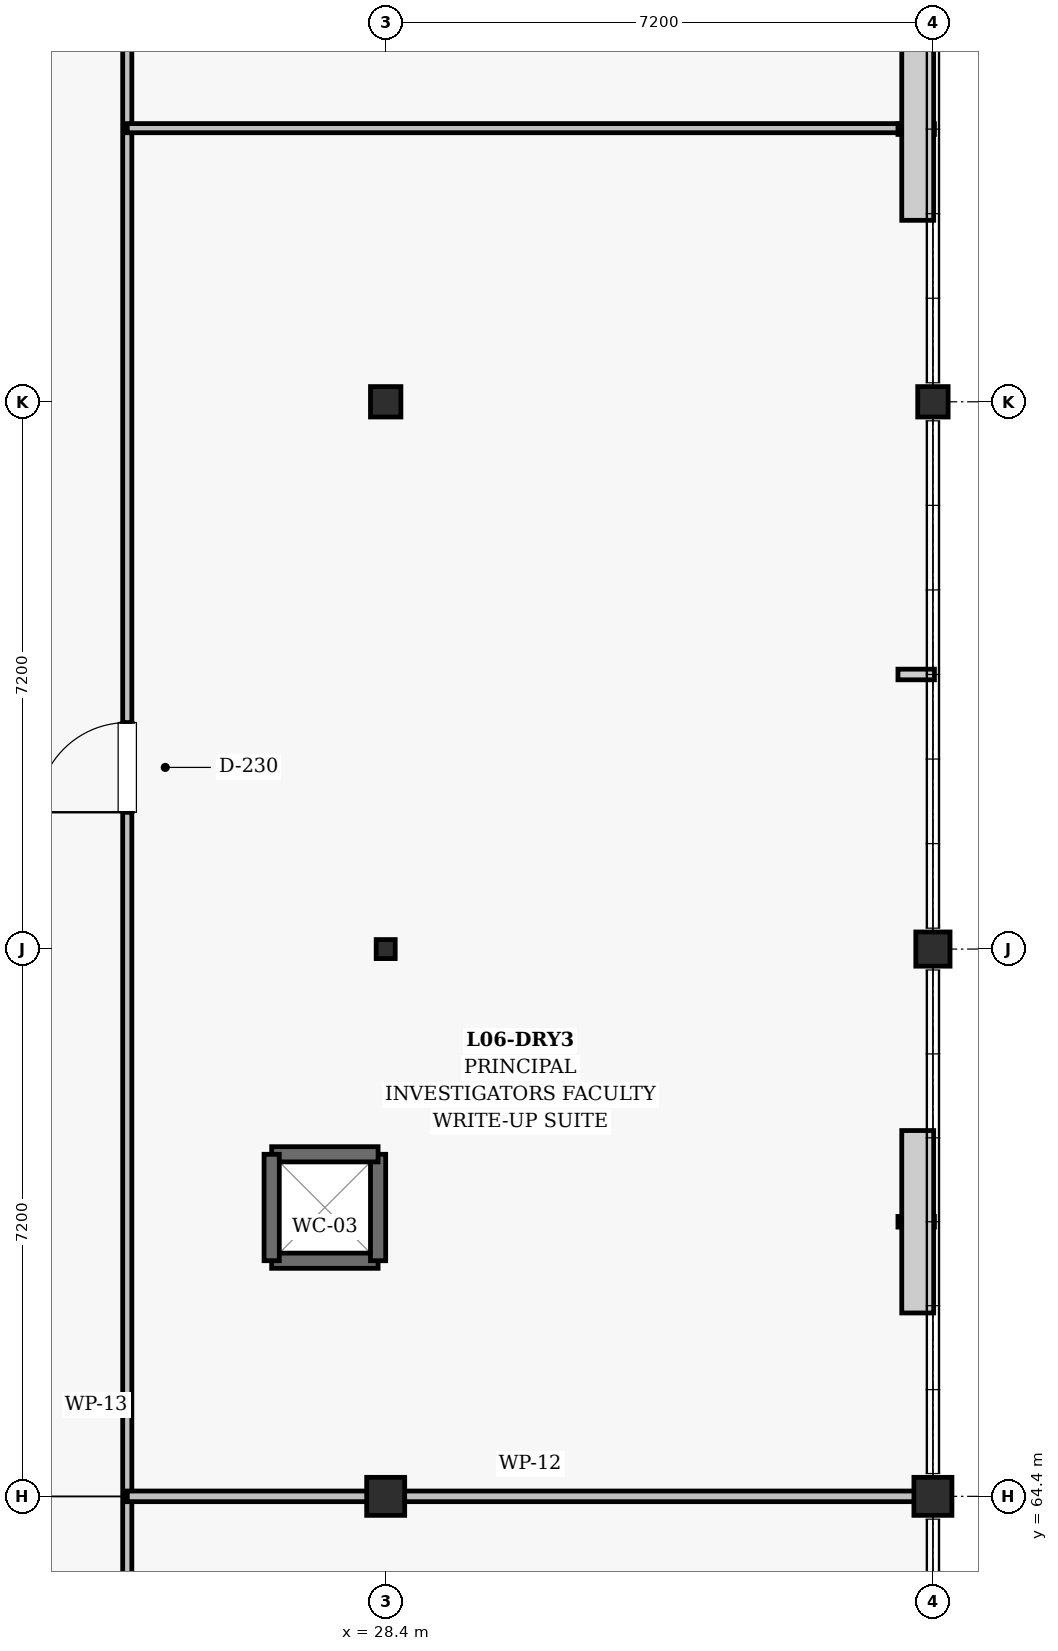
"""IFC4 building model, lengths in metres.
Left out: names, types, materials, properties, quantities, classifications, styles, units other than length and angle.
Written with IfcOpenShell. Run it as: python <this file> out.ifc"""

import sys

from ifc_helpers import new_model, si_unit, direction, frame, frame_2d, origin, origin_2d, place, context, subcontext, project, spatial, rectangle, i_section, extrude, element, fill, save


model = new_model("IFC4")
c1 = context("Model", 3, precision=1e-05, world=origin(), true_north=direction((0.0, 1.0)))
c2 = subcontext(c1, "Body", "Model", "MODEL_VIEW")
j1 = project(units=[si_unit("LENGTHUNIT", "METRE"), si_unit("PLANEANGLEUNIT", "RADIAN")], contexts=[c1])
p1 = place(None, origin())
s1 = spatial("IfcSite", under=j1, at=p1, CompositionType="ELEMENT")
p2 = place(p1, origin())
s2 = spatial("IfcBuilding", under=s1, at=p2, CompositionType="ELEMENT")
p3 = place(p2, frame((0.0, 0.0, 27.9)))
s3 = spatial("IfcBuildingStorey", under=s2, at=p3, CompositionType="ELEMENT", Elevation=27.9)
p4 = place(p3, frame((28.4, 64.4, 0.0), z_axis=(0.0, 0.0, 1.0), x_axis=(1.0, 0.0, 0.0)))
e1 = element("IfcColumn", 1, at=p4, inside=s3, PredefinedType="COLUMN", context=c2, shape_type="SweptSolid", body=[
    extrude(rectangle(XDim=0.5, YDim=0.5, at=origin_2d()), origin(), (0.0, 0.0, 1.0), 4.5),
])
p5 = place(p3, frame((28.4, 71.6, 0.0), z_axis=(0.0, 0.0, 1.0), x_axis=(1.0, 0.0, 0.0)))
e2 = element("IfcColumn", 2, at=p5, inside=s3, PredefinedType="COLUMN", context=c2, shape_type="SweptSolid", body=[
    extrude(i_section(OverallWidth=0.25, OverallDepth=0.25, WebThickness=0.009, FlangeThickness=0.01, FilletRadius=0.01, at=origin_2d()), origin(), (0.0, 0.0, 1.0), 4.5),
])
p6 = place(p3, frame((28.4, 78.8, 0.0), z_axis=(0.0, 0.0, 1.0), x_axis=(1.0, 0.0, 0.0)))
e3 = element("IfcColumn", 3, at=p6, inside=s3, PredefinedType="COLUMN", context=c2, shape_type="SweptSolid", body=[
    extrude(rectangle(XDim=0.4, YDim=0.4, at=origin_2d()), origin(), (0.0, 0.0, 1.0), 4.5),
])
p7 = place(p3, frame((35.6, 64.4, 0.0), z_axis=(0.0, 0.0, 1.0), x_axis=(1.0, 0.0, 0.0)))
e4 = element("IfcColumn", 4, at=p7, inside=s3, PredefinedType="COLUMN", context=c2, shape_type="SweptSolid", body=[
    extrude(rectangle(XDim=0.5, YDim=0.5, at=origin_2d()), origin(), (0.0, 0.0, 1.0), 4.5),
])
p8 = place(p3, frame((35.6, 71.6, 0.0), z_axis=(0.0, 0.0, 1.0), x_axis=(1.0, 0.0, 0.0)))
e5 = element("IfcColumn", 5, at=p8, inside=s3, PredefinedType="COLUMN", context=c2, shape_type="SweptSolid", body=[
    extrude(rectangle(XDim=0.45, YDim=0.45, at=origin_2d()), origin(), (0.0, 0.0, 1.0), 4.5),
])
p9 = place(p3, frame((35.6, 78.8, 0.0), z_axis=(0.0, 0.0, 1.0), x_axis=(1.0, 0.0, 0.0)))
e6 = element("IfcColumn", 6, at=p9, inside=s3, PredefinedType="COLUMN", context=c2, shape_type="SweptSolid", body=[
    extrude(rectangle(XDim=0.4, YDim=0.4, at=origin_2d()), origin(), (0.0, 0.0, 1.0), 4.5),
])
p10 = place(p3, frame((26.9, 67.5, 0.0), z_axis=(0.0, 0.0, 1.0), x_axis=(1.0, 0.0, 0.0)))
e7 = element("IfcWall", 7, at=p10, inside=s3, PredefinedType="SHEAR", context=c2, shape_type="SweptSolid", body=[
    extrude(rectangle(XDim=1.4, YDim=0.2, at=frame_2d((0.7, 0.0))), origin(), (0.0, 0.0, 1.0), 4.16),
])
p11 = place(p3, frame((28.3, 67.5, 0.0), z_axis=(0.0, 0.0, 1.0), x_axis=(0.0, 1.0, 0.0)))
e8 = element("IfcWall", 8, at=p11, inside=s3, PredefinedType="SHEAR", context=c2, shape_type="SweptSolid", body=[
    extrude(rectangle(XDim=1.4, YDim=0.2, at=frame_2d((0.7, 0.0))), origin(), (0.0, 0.0, 1.0), 4.16),
])
p12 = place(p3, frame((28.3, 68.9, 0.0), z_axis=(0.0, 0.0, 1.0), x_axis=(-1.0, 0.0, 0.0)))
e9 = element("IfcWall", 9, at=p12, inside=s3, PredefinedType="SHEAR", context=c2, shape_type="SweptSolid", body=[
    extrude(rectangle(XDim=1.4, YDim=0.2, at=frame_2d((0.7, 0.0))), origin(), (0.0, 0.0, 1.0), 4.16),
])
p13 = place(p3, frame((26.9, 68.9, 0.0), z_axis=(0.0, 0.0, 1.0), x_axis=(0.0, -1.0, 0.0)))
e10 = element("IfcWall", 10, at=p13, inside=s3, PredefinedType="SHEAR", context=c2, shape_type="SweptSolid", body=[
    extrude(rectangle(XDim=1.4, YDim=0.2, at=frame_2d((0.7, 0.0))), origin(), (0.0, 0.0, 1.0), 4.16),
])
p14 = place(p3, frame((25.0, 28.4, 0.0), z_axis=(0.0, 0.0, 1.0), x_axis=(0.0, 1.0, 0.0)))
e11 = element("IfcWall", 11, at=p14, inside=s3, PredefinedType="PARTITIONING", context=c2, shape_type="SweptSolid", body=[
    extrude(rectangle(XDim=74.4, YDim=0.12, at=frame_2d((37.2, 0.0))), origin(), (0.0, 0.0, 1.0), 3.36),
])
p15 = place(p14, frame((9.2, 0.0, 0.0)))
e12 = element("IfcOpeningElement", 12, at=p15, cuts=e11, PredefinedType="OPENING", context=c2, shape_type="SweptSolid", body=[
    extrude(rectangle(XDim=1.0, YDim=2.15, at=frame_2d((0.5, 1.075))), frame((0.0, 0.07, 0.0), z_axis=(0.0, -1.0, 0.0), x_axis=(1.0, 0.0, 0.0)), (0.0, 0.0, 1.0), 0.14),
])
p16 = place(p14, frame((27.0, 0.0, 0.0)))
e13 = element("IfcOpeningElement", 13, at=p16, cuts=e11, PredefinedType="OPENING", context=c2, shape_type="SweptSolid", body=[
    extrude(rectangle(XDim=1.1, YDim=2.15, at=frame_2d((0.55, 1.075))), frame((0.0, 0.07, 0.0), z_axis=(0.0, -1.0, 0.0), x_axis=(1.0, 0.0, 0.0)), (0.0, 0.0, 1.0), 0.14),
])
p17 = place(p14, frame((45.0, 0.0, 0.0)))
e14 = element("IfcOpeningElement", 14, at=p17, cuts=e11, PredefinedType="OPENING", context=c2, shape_type="SweptSolid", body=[
    extrude(rectangle(XDim=1.18, YDim=2.2, at=frame_2d((0.59, 1.1))), frame((0.0, 0.07, 0.0), z_axis=(0.0, -1.0, 0.0), x_axis=(1.0, 0.0, 0.0)), (0.0, 0.0, 1.0), 0.14),
])
p18 = place(p14, frame((66.0, 0.0, 0.0)))
e15 = element("IfcOpeningElement", 15, at=p18, cuts=e11, PredefinedType="OPENING", context=c2, shape_type="SweptSolid", body=[
    extrude(rectangle(XDim=1.25, YDim=2.2, at=frame_2d((0.625, 1.1))), frame((0.0, 0.07, 0.0), z_axis=(0.0, -1.0, 0.0), x_axis=(1.0, 0.0, 0.0)), (0.0, 0.0, 1.0), 0.14),
])
p19 = place(p3, frame((25.0, 64.4, 0.0), z_axis=(0.0, 0.0, 1.0), x_axis=(1.0, 0.0, 0.0)))
e16 = element("IfcWall", 16, at=p19, inside=s3, PredefinedType="PARTITIONING", context=c2, shape_type="SweptSolid", body=[
    extrude(rectangle(XDim=10.6, YDim=0.14, at=frame_2d((5.3, 0.0))), origin(), (0.0, 0.0, 1.0), 3.36),
])
p20 = place(p3, frame((25.0, 82.4, 0.0), z_axis=(0.0, 0.0, 1.0), x_axis=(1.0, 0.0, 0.0)))
e17 = element("IfcWall", 17, at=p20, inside=s3, PredefinedType="PARTITIONING", context=c2, shape_type="SweptSolid", body=[
    extrude(rectangle(XDim=10.6, YDim=0.12, at=frame_2d((5.3, 0.0))), origin(), (0.0, 0.0, 1.0), 3.56),
])
p21 = place(p17, origin())
e18 = element("IfcDoor", 18, at=p21, inside=s3, OperationType="SINGLE_SWING_LEFT", PredefinedType="DOOR", context=c2, shape_type="SweptSolid", body=[
    extrude(rectangle(XDim=1.18, YDim=2.2, at=frame_2d((0.59, 1.1))), frame((0.0, 0.025, 0.0), z_axis=(0.0, -1.0, 0.0), x_axis=(1.0, 0.0, 0.0)), (0.0, 0.0, 1.0), 0.05),
])
fill(e14, e18)
save(model, sys.argv[1])
